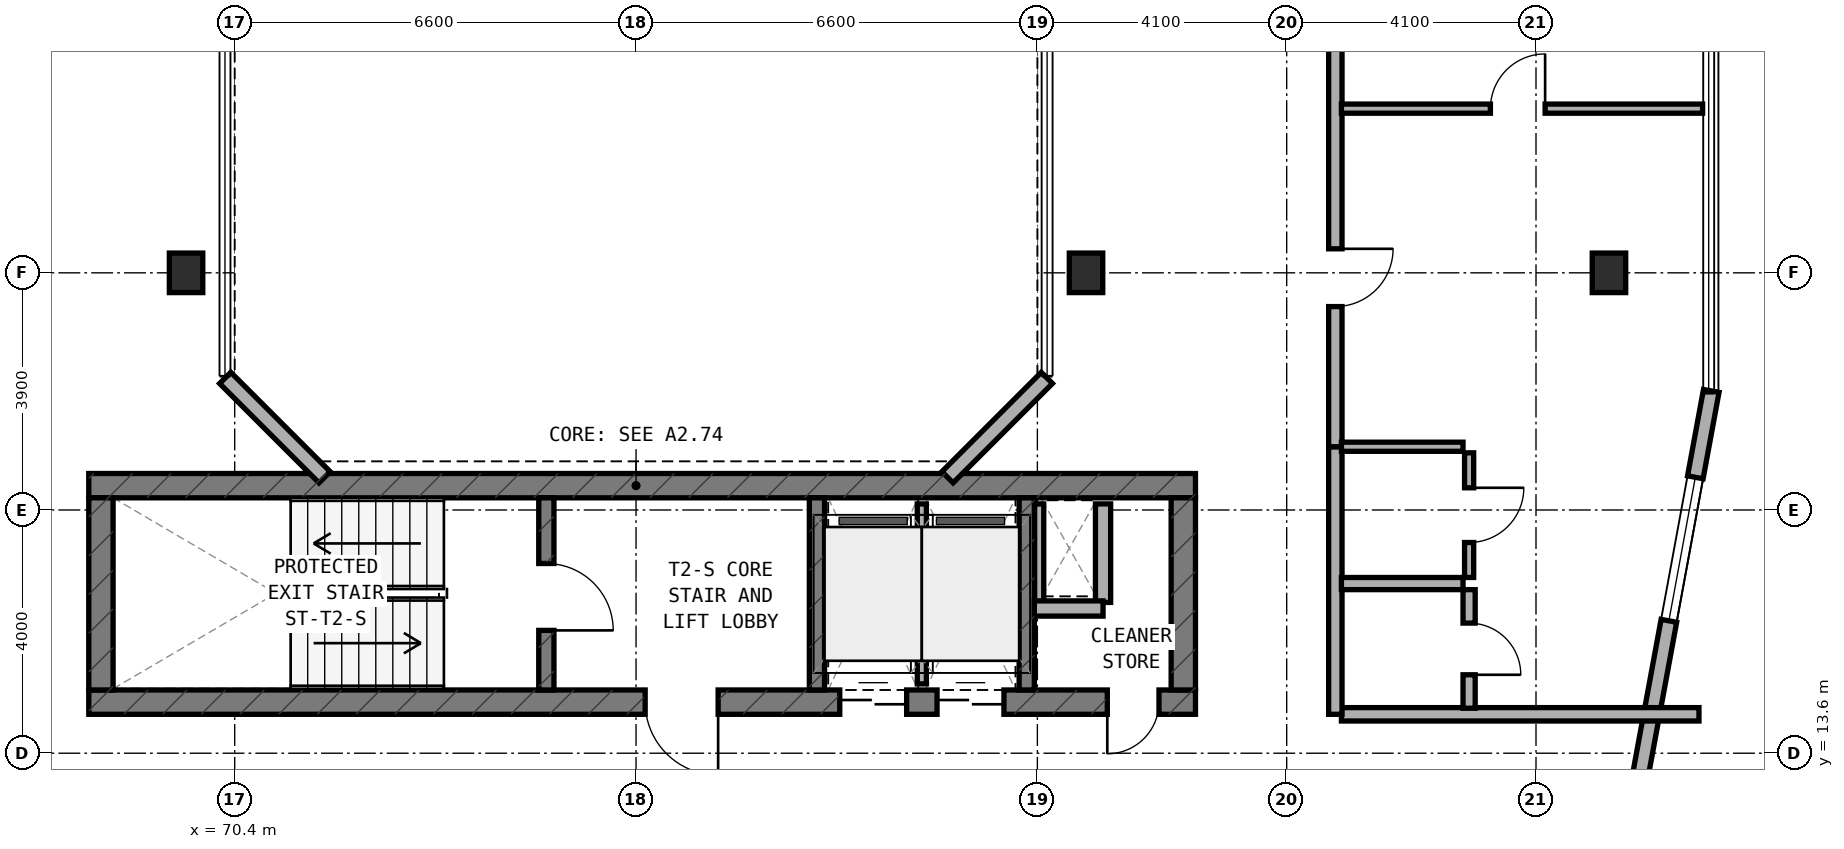
"""IFC4 building model, lengths in metres.
Left out: names, types, materials, properties, quantities, classifications, styles, units other than length and angle.
Written with IfcOpenShell. Run it as: python <this file> out.ifc"""

import sys

from ifc_helpers import new_model, si_unit, direction, frame, frame_2d, origin, origin_2d, place, context, subcontext, project, spatial, rectangle, extrude, element, fill, save


model = new_model("IFC4")
c1 = context("Model", 3, precision=1e-05, world=origin(), true_north=direction((0.0, 1.0)))
c2 = subcontext(c1, "Body", "Model", "MODEL_VIEW")
j1 = project(units=[si_unit("LENGTHUNIT", "METRE"), si_unit("PLANEANGLEUNIT", "RADIAN")], contexts=[c1])
p1 = place(None, origin())
s1 = spatial("IfcSite", under=j1, at=p1, CompositionType="ELEMENT")
p2 = place(p1, origin())
s2 = spatial("IfcBuilding", under=s1, at=p2, CompositionType="ELEMENT")
p3 = place(p2, frame((0.0, 0.0, 127.5)))
s3 = spatial("IfcBuildingStorey", under=s2, at=p3, CompositionType="ELEMENT", Elevation=127.5)
p4 = place(p3, frame((68.0, 14.44, 0.0), z_axis=(0.0, 0.0, 1.0), x_axis=(1.0, 0.0, 0.0)))
e1 = element("IfcWall", 1, at=p4, inside=s3, PredefinedType="SHEAR", context=c2, shape_type="SweptSolid", body=[
    extrude(rectangle(XDim=18.2, YDim=0.4, at=frame_2d((9.1, 0.0))), origin(), (0.0, 0.0, 1.0), 3.5),
])
p5 = place(p4, frame((9.15, 0.0, 0.0)))
e2 = element("IfcOpeningElement", 2, at=p5, cuts=e1, PredefinedType="OPENING", context=c2, shape_type="SweptSolid", body=[
    extrude(rectangle(XDim=1.2, YDim=2.15, at=frame_2d((0.6, 1.075))), frame((0.0, 0.21, 0.0), z_axis=(0.0, -1.0, 0.0), x_axis=(1.0, 0.0, 0.0)), (0.0, 0.0, 1.0), 0.42),
])
p6 = place(p4, frame((16.75, 0.0, 0.0)))
e3 = element("IfcOpeningElement", 3, at=p6, cuts=e1, PredefinedType="OPENING", context=c2, shape_type="SweptSolid", body=[
    extrude(rectangle(XDim=0.85, YDim=2.1, at=frame_2d((0.425, 1.05))), frame((0.0, 0.21, 0.0), z_axis=(0.0, -1.0, 0.0), x_axis=(1.0, 0.0, 0.0)), (0.0, 0.0, 1.0), 0.42),
])
p7 = place(p4, frame((12.35, 0.0, 0.0)))
e4 = element("IfcOpeningElement", 4, at=p7, cuts=e1, PredefinedType="OPENING", context=c2, shape_type="SweptSolid", body=[
    extrude(rectangle(XDim=1.1, YDim=2.15, at=frame_2d((0.55, 1.075))), frame((0.0, 0.21, 0.0), z_axis=(0.0, -1.0, 0.0), x_axis=(1.0, 0.0, 0.0)), (0.0, 0.0, 1.0), 0.42),
])
p8 = place(p4, frame((13.95, 0.0, 0.0)))
e5 = element("IfcOpeningElement", 5, at=p8, cuts=e1, PredefinedType="OPENING", context=c2, shape_type="SweptSolid", body=[
    extrude(rectangle(XDim=1.1, YDim=2.15, at=frame_2d((0.55, 1.075))), frame((0.0, 0.21, 0.0), z_axis=(0.0, -1.0, 0.0), x_axis=(1.0, 0.0, 0.0)), (0.0, 0.0, 1.0), 0.42),
])
p9 = place(p3, frame((68.0, 18.0, 0.0), z_axis=(0.0, 0.0, 1.0), x_axis=(1.0, 0.0, 0.0)))
e6 = element("IfcWall", 6, at=p9, inside=s3, PredefinedType="SHEAR", context=c2, shape_type="SweptSolid", body=[
    extrude(rectangle(XDim=18.2, YDim=0.4, at=frame_2d((9.1, 0.0))), origin(), (0.0, 0.0, 1.0), 3.5),
])
for number, where, z_axis, x_axis in (
    (7, (68.2, 14.64, 0.0), (0.0, 0.0, 1.0), (0.0, 1.0, 0.0)),
    (8, (86.0, 14.64, 0.0), (0.0, 0.0, 1.0), (0.0, 1.0, 0.0)),
):
    element("IfcWall", number, at=place(p3, frame(where, z_axis=z_axis, x_axis=x_axis)), inside=s3, PredefinedType="SHEAR", context=c2, shape_type="SweptSolid", body=[
        extrude(rectangle(XDim=3.16, YDim=0.4, at=frame_2d((1.58, 0.0))), origin(), (0.0, 0.0, 1.0), 3.5),
    ])
p10 = place(p3, frame((75.525, 14.64, 0.0), z_axis=(0.0, 0.0, 1.0), x_axis=(0.0, 1.0, 0.0)))
e9 = element("IfcWall", 9, at=p10, inside=s3, PredefinedType="STANDARD", context=c2, shape_type="SweptSolid", body=[
    extrude(rectangle(XDim=3.16, YDim=0.25, at=frame_2d((1.58, 0.0))), origin(), (0.0, 0.0, 1.0), 3.25),
])
p11 = place(p10, frame((0.98, 0.0, 0.0)))
e10 = element("IfcOpeningElement", 10, at=p11, cuts=e9, PredefinedType="OPENING", context=c2, shape_type="SweptSolid", body=[
    extrude(rectangle(XDim=1.1, YDim=2.15, at=frame_2d((0.55, 1.075))), frame((0.0, 0.135, 0.0), z_axis=(0.0, -1.0, 0.0), x_axis=(1.0, 0.0, 0.0)), (0.0, 0.0, 1.0), 0.27),
])
for number, where, z_axis, x_axis in (
    (11, (79.975, 14.64, 0.0), (0.0, 0.0, 1.0), (0.0, 1.0, 0.0)),
    (12, (83.425, 14.64, 0.0), (0.0, 0.0, 1.0), (0.0, 1.0, 0.0)),
):
    element("IfcWall", number, at=place(p3, frame(where, z_axis=z_axis, x_axis=x_axis)), inside=s3, PredefinedType="STANDARD", context=c2, shape_type="SweptSolid", body=[
        extrude(rectangle(XDim=3.16, YDim=0.25, at=frame_2d((1.58, 0.0))), origin(), (0.0, 0.0, 1.0), 3.25),
    ])
p12 = place(p3, frame((93.0, 21.5, 0.0), z_axis=(0.0, 0.0, 1.0), x_axis=(1.0, 0.0, 0.0)))
e13 = element("IfcColumn", 13, at=p12, inside=s3, PredefinedType="COLUMN", context=c2, shape_type="SweptSolid", body=[
    extrude(rectangle(XDim=0.55, YDim=0.65, at=origin_2d()), origin(), (0.0, 0.0, 1.0), 3.24),
])
for number, where, z_axis, x_axis in (
    (14, (69.6, 21.5, 0.0), (0.0, 0.0, 1.0), (1.0, 0.0, 0.0)),
    (15, (84.4, 21.5, 0.0), (0.0, 0.0, 1.0), (1.0, 0.0, 0.0)),
):
    element("IfcColumn", number, at=place(p3, frame(where, z_axis=z_axis, x_axis=x_axis)), inside=s3, PredefinedType="COLUMN", context=c2, shape_type="SweptSolid", body=[
        extrude(rectangle(XDim=0.55, YDim=0.65, at=origin_2d()), origin(), (0.0, 0.0, 1.0), 3.5),
    ])
p13 = place(p3, frame((93.071, 10.816, 0.0), z_axis=(0.0, 0.0, 1.0), x_axis=(0.181209963057, 0.983444431215, 0.0)))
e16 = element("IfcWall", 16, at=p13, inside=s3, PredefinedType="STANDARD", context=c2, shape_type="SweptSolid", body=[
    extrude(rectangle(XDim=8.889, YDim=0.26, at=frame_2d((4.445, 0.0))), origin(), (0.0, 0.0, 1.0), 3.25),
])
p14 = place(p13, frame((5.045, 0.0, 0.8)))
e17 = element("IfcOpeningElement", 17, at=p14, cuts=e16, PredefinedType="OPENING", context=c2, shape_type="SweptSolid", body=[
    extrude(rectangle(XDim=2.4, YDim=1.6, at=frame_2d((1.2, 0.8))), frame((0.0, 0.14, 0.0), z_axis=(0.0, -1.0, 0.0), x_axis=(1.0, 0.0, 0.0)), (0.0, 0.0, 1.0), 0.28),
])
for number, where, z_axis, x_axis in (
    (18, (82.122, 18.138, 0.0), (0.0, 0.0, 1.0), (0.707, 0.707, 0.0)),
    (19, (70.244, 19.772, 0.0), (0.0, 0.0, 1.0), (0.707, -0.707, 0.0)),
):
    element("IfcWall", number, at=place(p3, frame(where, z_axis=z_axis, x_axis=x_axis)), inside=s3, PredefinedType="STANDARD", context=c2, shape_type="SweptSolid", body=[
        extrude(rectangle(XDim=2.311, YDim=0.26, at=frame_2d((1.155, 0.0))), origin(), (0.0, 0.0, 1.0), 3.25),
    ])
p15 = place(p3, frame((83.63, 16.08, 0.0), z_axis=(0.0, 0.0, 1.0), x_axis=(0.0, 1.0, 0.0)))
e20 = element("IfcWall", 20, at=p15, inside=s3, PredefinedType="PARTITIONING", context=c2, shape_type="SweptSolid", body=[
    extrude(rectangle(XDim=1.62, YDim=0.15, at=frame_2d((0.81, 0.0))), origin(), (0.0, 0.0, 1.0), 3.22),
])
p16 = place(p3, frame((84.68, 16.08, 0.0), z_axis=(0.0, 0.0, 1.0), x_axis=(0.0, 1.0, 0.0)))
e21 = element("IfcWall", 21, at=p16, inside=s3, PredefinedType="SOLIDWALL", context=c2, shape_type="SweptSolid", body=[
    extrude(rectangle(XDim=1.62, YDim=0.25, at=frame_2d((0.81, 0.0))), origin(), (0.0, 0.0, 1.0), 3.22),
])
p17 = place(p3, frame((83.55, 15.98, 0.0), z_axis=(0.0, 0.0, 1.0), x_axis=(1.0, 0.0, 0.0)))
e22 = element("IfcWall", 22, at=p17, inside=s3, PredefinedType="SOLIDWALL", context=c2, shape_type="SweptSolid", body=[
    extrude(rectangle(XDim=1.13, YDim=0.25, at=frame_2d((0.565, 0.0))), origin(), (0.0, 0.0, 1.0), 3.22),
])
p18 = place(p3, frame((81.7, 14.74, 0.0), z_axis=(0.0, 0.0, 1.0), x_axis=(0.0, 1.0, 0.0)))
e23 = element("IfcWall", 23, at=p18, inside=s3, PredefinedType="PARTITIONING", context=c2, shape_type="SweptSolid", body=[
    extrude(rectangle(XDim=2.96, YDim=0.15, at=frame_2d((1.48, 0.0))), origin(), (0.0, 0.0, 1.0), 3.22),
])
p19 = place(p3, frame((88.6, 14.24, 0.0), z_axis=(0.0, 0.0, 1.0), x_axis=(1.0, 0.0, 0.0)))
e24 = element("IfcWall", 24, at=p19, inside=s3, PredefinedType="SOLIDWALL", context=c2, shape_type="SweptSolid", body=[
    extrude(rectangle(XDim=5.88, YDim=0.22, at=frame_2d((2.94, 0.0))), origin(), (0.0, 0.0, 1.0), 2.815),
])
p20 = place(p3, frame((88.5, 14.24, 0.0), z_axis=(0.0, 0.0, 1.0), x_axis=(0.0, 1.0, 0.0)))
e25 = element("IfcWall", 25, at=p20, inside=s3, PredefinedType="SOLIDWALL", context=c2, shape_type="SweptSolid", body=[
    extrude(rectangle(XDim=4.4, YDim=0.22, at=frame_2d((2.2, 0.0))), origin(), (0.0, 0.0, 1.0), 3.22),
])
p21 = place(p3, frame((88.5, 18.64, 0.0), z_axis=(0.0, 0.0, 1.0), x_axis=(0.0, 1.0, 0.0)))
e26 = element("IfcWall", 26, at=p21, inside=s3, PredefinedType="SOLIDWALL", context=c2, shape_type="SweptSolid", body=[
    extrude(rectangle(XDim=9.36, YDim=0.22, at=frame_2d((4.68, 0.0))), origin(), (0.0, 0.0, 1.0), 2.815),
])
p22 = place(p21, frame((2.305, 0.0, 0.0)))
e27 = element("IfcOpeningElement", 27, at=p22, cuts=e26, PredefinedType="OPENING", context=c2, shape_type="SweptSolid", body=[
    extrude(rectangle(XDim=0.95, YDim=2.1, at=frame_2d((0.475, 1.05))), frame((0.0, 0.12, 0.0), z_axis=(0.0, -1.0, 0.0), x_axis=(1.0, 0.0, 0.0)), (0.0, 0.0, 1.0), 0.24),
])
p23 = place(p3, frame((88.6, 24.2, 0.0), z_axis=(0.0, 0.0, 1.0), x_axis=(1.0, 0.0, 0.0)))
e28 = element("IfcWall", 28, at=p23, inside=s3, PredefinedType="PARTITIONING", context=c2, shape_type="SweptSolid", body=[
    extrude(rectangle(XDim=5.94, YDim=0.15, at=frame_2d((2.97, 0.0))), origin(), (0.0, 0.0, 1.0), 2.815),
])
p24 = place(p23, frame((2.45, 0.0, 0.0)))
e29 = element("IfcOpeningElement", 29, at=p24, cuts=e28, PredefinedType="OPENING", context=c2, shape_type="SweptSolid", body=[
    extrude(rectangle(XDim=0.9, YDim=2.1, at=frame_2d((0.45, 1.05))), frame((0.0, 0.085, 0.0), z_axis=(0.0, -1.0, 0.0), x_axis=(1.0, 0.0, 0.0)), (0.0, 0.0, 1.0), 0.17),
])
p25 = place(p3, frame((88.6, 16.39, 0.0), z_axis=(0.0, 0.0, 1.0), x_axis=(1.0, 0.0, 0.0)))
e30 = element("IfcWall", 30, at=p25, inside=s3, PredefinedType="PLUMBINGWALL", context=c2, shape_type="SweptSolid", body=[
    extrude(rectangle(XDim=2.0, YDim=0.2, at=frame_2d((1.0, 0.0))), origin(), (0.0, 0.0, 1.0), 3.22),
])
p26 = place(p3, frame((88.6, 18.64, 0.0), z_axis=(0.0, 0.0, 1.0), x_axis=(1.0, 0.0, 0.0)))
e31 = element("IfcWall", 31, at=p26, inside=s3, PredefinedType="PARTITIONING", context=c2, shape_type="SweptSolid", body=[
    extrude(rectangle(XDim=2.0, YDim=0.15, at=frame_2d((1.0, 0.0))), origin(), (0.0, 0.0, 1.0), 3.22),
])
p27 = place(p3, frame((90.7, 14.34, 0.0), z_axis=(0.0, 0.0, 1.0), x_axis=(0.0, 1.0, 0.0)))
e32 = element("IfcWall", 32, at=p27, inside=s3, PredefinedType="PLUMBINGWALL", context=c2, shape_type="SweptSolid", body=[
    extrude(rectangle(XDim=1.95, YDim=0.2, at=frame_2d((0.975, 0.0))), origin(), (0.0, 0.0, 1.0), 3.22),
])
p28 = place(p27, frame((0.55, 0.0, 0.0)))
e33 = element("IfcOpeningElement", 33, at=p28, cuts=e32, PredefinedType="OPENING", context=c2, shape_type="SweptSolid", body=[
    extrude(rectangle(XDim=0.85, YDim=2.1, at=frame_2d((0.425, 1.05))), frame((0.0, 0.11, 0.0), z_axis=(0.0, -1.0, 0.0), x_axis=(1.0, 0.0, 0.0)), (0.0, 0.0, 1.0), 0.22),
])
p29 = place(p3, frame((90.7, 16.49, 0.0), z_axis=(0.0, 0.0, 1.0), x_axis=(0.0, 1.0, 0.0)))
e34 = element("IfcWall", 34, at=p29, inside=s3, PredefinedType="PARTITIONING", context=c2, shape_type="SweptSolid", body=[
    extrude(rectangle(XDim=2.05, YDim=0.15, at=frame_2d((1.025, 0.0))), origin(), (0.0, 0.0, 1.0), 3.22),
])
p30 = place(p29, frame((0.575, 0.0, 0.0)))
e35 = element("IfcOpeningElement", 35, at=p30, cuts=e34, PredefinedType="OPENING", context=c2, shape_type="SweptSolid", body=[
    extrude(rectangle(XDim=0.9, YDim=2.1, at=frame_2d((0.45, 1.05))), frame((0.0, 0.085, 0.0), z_axis=(0.0, -1.0, 0.0), x_axis=(1.0, 0.0, 0.0)), (0.0, 0.0, 1.0), 0.17),
])
p31 = place(p14, origin())
e36 = element("IfcWindow", 36, at=p31, inside=s3, PartitioningType="SINGLE_PANEL", PredefinedType="WINDOW", context=c2, shape_type="SweptSolid", body=[
    extrude(rectangle(XDim=2.4, YDim=1.6, at=frame_2d((1.2, 0.8))), frame((0.0, 0.03, 0.0), z_axis=(0.0, -1.0, 0.0), x_axis=(1.0, 0.0, 0.0)), (0.0, 0.0, 1.0), 0.06),
])
fill(e17, e36)
p32 = place(p11, frame((1.1, 0.0, 0.0), z_axis=(0.0, 0.0, 1.0), x_axis=(-1.0, 0.0, 0.0)))
e37 = element("IfcDoor", 37, at=p32, inside=s3, OperationType="SINGLE_SWING_RIGHT", PredefinedType="DOOR", context=c2, shape_type="SweptSolid", body=[
    extrude(rectangle(XDim=1.1, YDim=2.15, at=frame_2d((0.55, 1.075))), frame((0.0, 0.025, 0.0), z_axis=(0.0, -1.0, 0.0), x_axis=(1.0, 0.0, 0.0)), (0.0, 0.0, 1.0), 0.05),
])
fill(e10, e37)
p33 = place(p5, frame((1.2, 0.0, 0.0), z_axis=(0.0, 0.0, 1.0), x_axis=(-1.0, 0.0, 0.0)))
e38 = element("IfcDoor", 38, at=p33, inside=s3, OperationType="SINGLE_SWING_LEFT", PredefinedType="DOOR", context=c2, shape_type="SweptSolid", body=[
    extrude(rectangle(XDim=1.2, YDim=2.15, at=frame_2d((0.6, 1.075))), frame((0.0, 0.025, 0.0), z_axis=(0.0, -1.0, 0.0), x_axis=(1.0, 0.0, 0.0)), (0.0, 0.0, 1.0), 0.05),
])
fill(e2, e38)
p34 = place(p6, frame((0.85, 0.0, 0.0), z_axis=(0.0, 0.0, 1.0), x_axis=(-1.0, 0.0, 0.0)))
e39 = element("IfcDoor", 39, at=p34, inside=s3, OperationType="SINGLE_SWING_RIGHT", PredefinedType="DOOR", context=c2, shape_type="SweptSolid", body=[
    extrude(rectangle(XDim=0.85, YDim=2.1, at=frame_2d((0.425, 1.05))), frame((0.0, 0.025, 0.0), z_axis=(0.0, -1.0, 0.0), x_axis=(1.0, 0.0, 0.0)), (0.0, 0.0, 1.0), 0.05),
])
fill(e3, e39)
p35 = place(p7, frame((1.1, 0.0, 0.0), z_axis=(0.0, 0.0, 1.0), x_axis=(-1.0, 0.0, 0.0)))
e40 = element("IfcDoor", 40, at=p35, inside=s3, OperationType="DOUBLE_DOOR_SLIDING", PredefinedType="DOOR", context=c2, shape_type="SweptSolid", body=[
    extrude(rectangle(XDim=1.1, YDim=2.15, at=frame_2d((0.55, 1.075))), frame((0.0, 0.025, 0.0), z_axis=(0.0, -1.0, 0.0), x_axis=(1.0, 0.0, 0.0)), (0.0, 0.0, 1.0), 0.05),
])
fill(e4, e40)
p36 = place(p8, frame((1.1, 0.0, 0.0), z_axis=(0.0, 0.0, 1.0), x_axis=(-1.0, 0.0, 0.0)))
e41 = element("IfcDoor", 41, at=p36, inside=s3, OperationType="DOUBLE_DOOR_SLIDING", PredefinedType="DOOR", context=c2, shape_type="SweptSolid", body=[
    extrude(rectangle(XDim=1.1, YDim=2.15, at=frame_2d((0.55, 1.075))), frame((0.0, 0.025, 0.0), z_axis=(0.0, -1.0, 0.0), x_axis=(1.0, 0.0, 0.0)), (0.0, 0.0, 1.0), 0.05),
])
fill(e5, e41)
p37 = place(p22, frame((0.95, 0.0, 0.0), z_axis=(0.0, 0.0, 1.0), x_axis=(-1.0, 0.0, 0.0)))
e42 = element("IfcDoor", 42, at=p37, inside=s3, OperationType="SINGLE_SWING_LEFT", PredefinedType="DOOR", context=c2, shape_type="SweptSolid", body=[
    extrude(rectangle(XDim=0.95, YDim=2.1, at=frame_2d((0.475, 1.05))), frame((0.0, 0.025, 0.0), z_axis=(0.0, -1.0, 0.0), x_axis=(1.0, 0.0, 0.0)), (0.0, 0.0, 1.0), 0.05),
])
fill(e27, e42)
p38 = place(p24, origin())
e43 = element("IfcDoor", 43, at=p38, inside=s3, OperationType="SINGLE_SWING_RIGHT", PredefinedType="DOOR", context=c2, shape_type="SweptSolid", body=[
    extrude(rectangle(XDim=0.9, YDim=2.1, at=frame_2d((0.45, 1.05))), frame((0.0, 0.025, 0.0), z_axis=(0.0, -1.0, 0.0), x_axis=(1.0, 0.0, 0.0)), (0.0, 0.0, 1.0), 0.05),
])
fill(e29, e43)
p39 = place(p28, frame((0.85, 0.0, 0.0), z_axis=(0.0, 0.0, 1.0), x_axis=(-1.0, 0.0, 0.0)))
e44 = element("IfcDoor", 44, at=p39, inside=s3, OperationType="SINGLE_SWING_RIGHT", PredefinedType="DOOR", context=c2, shape_type="SweptSolid", body=[
    extrude(rectangle(XDim=0.85, YDim=2.1, at=frame_2d((0.425, 1.05))), frame((0.0, 0.025, 0.0), z_axis=(0.0, -1.0, 0.0), x_axis=(1.0, 0.0, 0.0)), (0.0, 0.0, 1.0), 0.05),
])
fill(e33, e44)
p40 = place(p30, frame((0.9, 0.0, 0.0), z_axis=(0.0, 0.0, 1.0), x_axis=(-1.0, 0.0, 0.0)))
e45 = element("IfcDoor", 45, at=p40, inside=s3, OperationType="SINGLE_SWING_LEFT", PredefinedType="DOOR", context=c2, shape_type="SweptSolid", body=[
    extrude(rectangle(XDim=0.9, YDim=2.1, at=frame_2d((0.45, 1.05))), frame((0.0, 0.025, 0.0), z_axis=(0.0, -1.0, 0.0), x_axis=(1.0, 0.0, 0.0)), (0.0, 0.0, 1.0), 0.05),
])
fill(e35, e45)
save(model, sys.argv[1])
